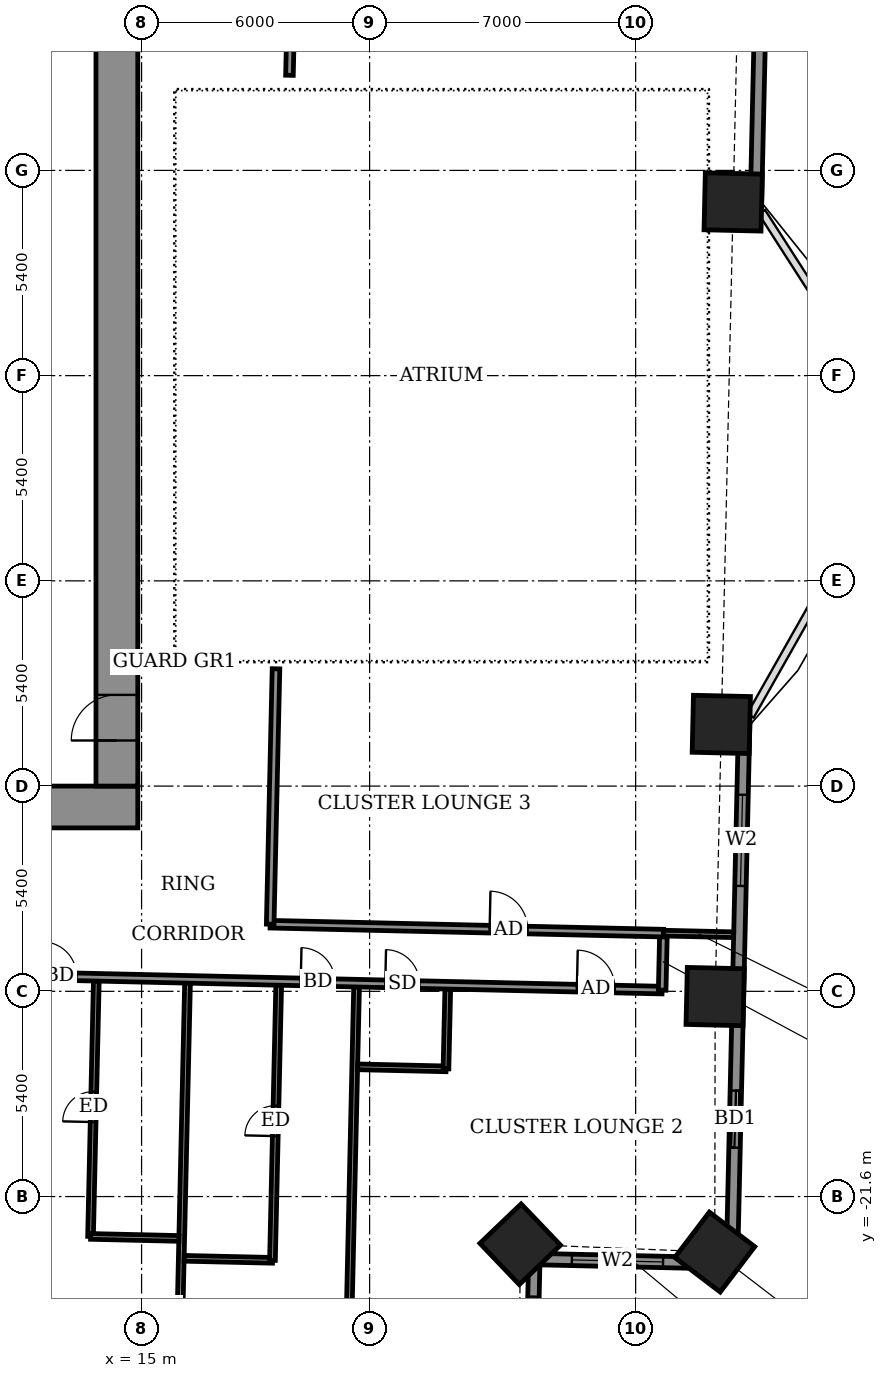
"""IFC4 building model, lengths in metres.
Left out: names, types, materials, properties, quantities, classifications, styles, units other than length and angle.
Written with IfcOpenShell. Run it as: python <this file> out.ifc"""

import sys

from ifc_helpers import new_model, si_unit, direction, frame, frame_2d, origin, origin_2d, place, context, subcontext, project, spatial, rectangle, extrude, element, fill, save


model = new_model("IFC4")
c1 = context("Model", 3, precision=1e-05, world=origin(), true_north=direction((0.0, 1.0)))
c2 = subcontext(c1, "Body", "Model", "MODEL_VIEW")
j1 = project(units=[si_unit("LENGTHUNIT", "METRE"), si_unit("PLANEANGLEUNIT", "RADIAN")], contexts=[c1])
p1 = place(None, origin())
s1 = spatial("IfcSite", under=j1, at=p1, CompositionType="ELEMENT")
p2 = place(p1, origin())
s2 = spatial("IfcBuilding", under=s1, at=p2, CompositionType="ELEMENT")
p3 = place(p2, frame((0.0, 0.0, 56.7)))
s3 = spatial("IfcBuildingStorey", under=s2, at=p3, CompositionType="ELEMENT", Elevation=56.7)
for number, where, z_axis, x_axis in (
    (1, (24.963, -22.855, -0.55), (0.0, 0.0, 1.0), (0.723, 0.691, 0.0)),
    (2, (30.082, -23.061, -0.55), (0.0, 0.0, 1.0), (0.606, 0.796, 0.0)),
    (3, (30.092, -16.338, -0.55), (0.0, 0.0, 1.0), (0.023, 1.0, 0.0)),
    (4, (30.254, -9.177, -0.55), (0.0, 0.0, 1.0), (0.023, 1.0, 0.0)),
    (5, (30.566, 4.57, -0.55), (0.0, 0.0, 1.0), (0.023, 1.0, 0.0)),
):
    element("IfcColumn", number, at=place(p3, frame(where, z_axis=z_axis, x_axis=x_axis)), inside=s3, PredefinedType="COLUMN", context=c2, shape_type="SweptSolid", body=[
        extrude(rectangle(XDim=1.5, YDim=1.5, at=origin_2d()), origin(), (0.0, 0.0, 1.0), 3.6),
    ])
p4 = place(p3, frame((30.533, -23.362, 0.0), z_axis=(0.0, 0.0, 1.0), x_axis=(0.022698800888, 0.999742349027, 0.0)))
e6 = element("IfcWall", 6, at=p4, inside=s3, PredefinedType="SOLIDWALL", context=c2, shape_type="SweptSolid", body=[
    extrude(rectangle(XDim=14.23, YDim=0.3, at=frame_2d((7.115, 0.0))), origin(), (0.0, 0.0, 1.0), 3.05),
])
p5 = place(p4, frame((3.05, 0.0, 0.0)))
e7 = element("IfcOpeningElement", 7, at=p5, cuts=e6, PredefinedType="OPENING", context=c2, shape_type="SweptSolid", body=[
    extrude(rectangle(XDim=1.5, YDim=2.4, at=frame_2d((0.75, 1.2))), frame((0.0, 0.16, 0.0), z_axis=(0.0, -1.0, 0.0), x_axis=(1.0, 0.0, 0.0)), (0.0, 0.0, 1.0), 0.32),
])
p6 = place(p4, frame((9.937, 0.0, 0.9)))
e8 = element("IfcOpeningElement", 8, at=p6, cuts=e6, PredefinedType="OPENING", context=c2, shape_type="SweptSolid", body=[
    extrude(rectangle(XDim=2.4, YDim=1.5, at=frame_2d((1.2, 0.75))), frame((0.0, 0.16, 0.0), z_axis=(0.0, -1.0, 0.0), x_axis=(1.0, 0.0, 0.0)), (0.0, 0.0, 1.0), 0.32),
])
p7 = place(p3, frame((31.165, 4.502, 0.0), z_axis=(0.0, 0.0, 1.0), x_axis=(0.022716307128, 0.999741951401, 0.0)))
e9 = element("IfcWall", 9, at=p7, inside=s3, PredefinedType="SOLIDWALL", context=c2, shape_type="SweptSolid", body=[
    extrude(rectangle(XDim=15.229, YDim=0.3, at=frame_2d((7.615, 0.0))), origin(), (0.0, 0.0, 1.0), 3.05),
])
p8 = place(p7, frame((6.072, 0.0, 0.9)))
e10 = element("IfcOpeningElement", 10, at=p8, cuts=e9, PredefinedType="OPENING", context=c2, shape_type="SweptSolid", body=[
    extrude(rectangle(XDim=0.9, YDim=1.5, at=frame_2d((0.45, 0.75))), frame((0.0, 0.16, 0.0), z_axis=(0.0, -1.0, 0.0), x_axis=(1.0, 0.0, 0.0)), (0.0, 0.0, 1.0), 0.32),
])
p9 = place(p7, frame((11.684, 0.0, 0.0)))
e11 = element("IfcOpeningElement", 11, at=p9, cuts=e9, PredefinedType="OPENING", context=c2, shape_type="SweptSolid", body=[
    extrude(rectangle(XDim=1.5, YDim=2.4, at=frame_2d((0.75, 1.2))), frame((0.0, 0.16, 0.0), z_axis=(0.0, -1.0, 0.0), x_axis=(1.0, 0.0, 0.0)), (0.0, 0.0, 1.0), 0.32),
])
p10 = place(p3, frame((25.216, -28.443, 0.0), z_axis=(0.0, 0.0, 1.0), x_axis=(0.022674484462, 0.999742900827, 0.0)))
e12 = element("IfcWall", 12, at=p10, inside=s3, PredefinedType="SOLIDWALL", context=c2, shape_type="SweptSolid", body=[
    extrude(rectangle(XDim=5.2, YDim=0.3, at=frame_2d((2.6, 0.0))), origin(), (0.0, 0.0, 1.0), 2.55),
])
p11 = place(p10, frame((1.811, 0.0, 0.9)))
e13 = element("IfcOpeningElement", 13, at=p11, cuts=e12, PredefinedType="OPENING", context=c2, shape_type="SweptSolid", body=[
    extrude(rectangle(XDim=2.4, YDim=1.5, at=frame_2d((1.2, 0.75))), frame((0.0, 0.16, 0.0), z_axis=(0.0, -1.0, 0.0), x_axis=(1.0, 0.0, 0.0)), (0.0, 0.0, 1.0), 0.32),
])
p12 = place(p3, frame((25.334, -23.244, 0.0), z_axis=(0.0, 0.0, 1.0), x_axis=(0.999741811307, -0.022722471786, 0.0)))
e14 = element("IfcWall", 14, at=p12, inside=s3, PredefinedType="SOLIDWALL", context=c2, shape_type="SweptSolid", body=[
    extrude(rectangle(XDim=5.2, YDim=0.3, at=frame_2d((2.6, 0.0))), origin(), (0.0, 0.0, 1.0), 2.55),
])
p13 = place(p12, frame((0.988, 0.0, 0.9)))
e15 = element("IfcOpeningElement", 15, at=p13, cuts=e14, PredefinedType="OPENING", context=c2, shape_type="SweptSolid", body=[
    extrude(rectangle(XDim=2.4, YDim=1.5, at=frame_2d((1.2, 0.75))), frame((0.0, 0.16, 0.0), z_axis=(0.0, -1.0, 0.0), x_axis=(1.0, 0.0, 0.0)), (0.0, 0.0, 1.0), 0.32),
])
p14 = place(p3, frame((15.934, -28.082, 0.0), z_axis=(0.0, 0.0, 1.0), x_axis=(0.022719113715, 0.999741887625, 0.0)))
e16 = element("IfcWall", 16, at=p14, inside=s3, PredefinedType="PARTITIONING", context=c2, shape_type="SweptSolid", body=[
    extrude(rectangle(XDim=12.1, YDim=0.15, at=frame_2d((6.05, 0.0))), origin(), (0.0, 0.0, 1.0), 2.55),
])
p15 = place(p3, frame((20.383, -28.183, 0.0), z_axis=(0.0, 0.0, 1.0), x_axis=(0.022637991173, 0.99974372784, 0.0)))
e17 = element("IfcWall", 17, at=p15, inside=s3, PredefinedType="PARTITIONING", context=c2, shape_type="SweptSolid", body=[
    extrude(rectangle(XDim=12.1, YDim=0.15, at=frame_2d((6.05, 0.0))), origin(), (0.0, 0.0, 1.0), 2.55),
])
p16 = place(p3, frame((16.121, -23.225, 0.0), z_axis=(0.0, 0.0, 1.0), x_axis=(0.999740478815, -0.022781023197, 0.0)))
e18 = element("IfcWall", 18, at=p16, inside=s3, PredefinedType="PARTITIONING", context=c2, shape_type="SweptSolid", body=[
    extrude(rectangle(XDim=2.325, YDim=0.15, at=frame_2d((1.163, 0.0))), origin(), (0.0, 0.0, 1.0), 3.05),
])
p17 = place(p3, frame((18.444, -23.278, 0.0), z_axis=(0.0, 0.0, 1.0), x_axis=(0.022627186748, 0.999743972435, 0.0)))
e19 = element("IfcWall", 19, at=p17, inside=s3, PredefinedType="PARTITIONING", context=c2, shape_type="SweptSolid", body=[
    extrude(rectangle(XDim=7.24, YDim=0.15, at=frame_2d((3.62, 0.0))), origin(), (0.0, 0.0, 1.0), 3.05),
])
p18 = place(p17, frame((3.27, 0.0, 0.0)))
e20 = element("IfcOpeningElement", 20, at=p18, cuts=e19, PredefinedType="OPENING", context=c2, shape_type="SweptSolid", body=[
    extrude(rectangle(XDim=0.8, YDim=2.1, at=frame_2d((0.4, 1.05))), frame((0.0, 0.085, 0.0), z_axis=(0.0, -1.0, 0.0), x_axis=(1.0, 0.0, 0.0)), (0.0, 0.0, 1.0), 0.17),
])
p19 = place(p3, frame((13.657, -22.649, 0.0), z_axis=(0.0, 0.0, 1.0), x_axis=(0.022634748998, 0.99974380125, 0.0)))
e21 = element("IfcWall", 21, at=p19, inside=s3, PredefinedType="PARTITIONING", context=c2, shape_type="SweptSolid", body=[
    extrude(rectangle(XDim=6.72, YDim=0.15, at=frame_2d((3.36, 0.0))), origin(), (0.0, 0.0, 1.0), 3.05),
])
p20 = place(p19, frame((3.01, 0.0, 0.0)))
e22 = element("IfcOpeningElement", 22, at=p20, cuts=e21, PredefinedType="OPENING", context=c2, shape_type="SweptSolid", body=[
    extrude(rectangle(XDim=0.8, YDim=2.1, at=frame_2d((0.4, 1.05))), frame((0.0, 0.085, 0.0), z_axis=(0.0, -1.0, 0.0), x_axis=(1.0, 0.0, 0.0)), (0.0, 0.0, 1.0), 0.17),
])
for number, where, z_axis, x_axis in (
    (23, (13.659, -22.649, 0.0), (0.0, 0.0, 1.0), (1.0, -0.023, 0.0)),
    (24, (20.687, -18.187, 0.0), (0.0, 0.0, 1.0), (1.0, -0.023, 0.0)),
):
    element("IfcWall", number, at=place(p3, frame(where, z_axis=z_axis, x_axis=x_axis)), inside=s3, PredefinedType="PARTITIONING", context=c2, shape_type="SweptSolid", body=[
        extrude(rectangle(XDim=2.324, YDim=0.15, at=frame_2d((1.162, 0.0))), origin(), (0.0, 0.0, 1.0), 3.05),
    ])
p21 = place(p3, frame((23.009, -18.24, 0.0), z_axis=(0.0, 0.0, 1.0), x_axis=(0.022792727877, 0.999740212033, 0.0)))
e25 = element("IfcWall", 25, at=p21, inside=s3, PredefinedType="PARTITIONING", context=c2, shape_type="SweptSolid", body=[
    extrude(rectangle(XDim=2.099, YDim=0.15, at=frame_2d((1.05, 0.0))), origin(), (0.0, 0.0, 1.0), 3.05),
])
p22 = place(p3, frame((-26.126, -14.924, 0.0), z_axis=(0.0, 0.0, 1.0), x_axis=(0.999742687583, -0.0226838847, 0.0)))
e26 = element("IfcWall", 26, at=p22, inside=s3, PredefinedType="PARTITIONING", context=c2, shape_type="SweptSolid", body=[
    extrude(rectangle(XDim=54.836, YDim=0.2, at=frame_2d((27.418, 0.0))), origin(), (0.0, 0.0, 1.0), 3.05),
])
p23 = place(p22, frame((0.775, 0.0, 0.0)))
e27 = element("IfcOpeningElement", 27, at=p23, cuts=e26, PredefinedType="OPENING", context=c2, shape_type="SweptSolid", body=[
    extrude(rectangle(XDim=1.0, YDim=2.1, at=frame_2d((0.5, 1.05))), frame((0.0, 0.11, 0.0), z_axis=(0.0, -1.0, 0.0), x_axis=(1.0, 0.0, 0.0)), (0.0, 0.0, 1.0), 0.22),
])
p24 = place(p22, frame((5.45, 0.0, 0.0)))
e28 = element("IfcOpeningElement", 28, at=p24, cuts=e26, PredefinedType="OPENING", context=c2, shape_type="SweptSolid", body=[
    extrude(rectangle(XDim=0.9, YDim=2.1, at=frame_2d((0.45, 1.05))), frame((0.0, 0.11, 0.0), z_axis=(0.0, -1.0, 0.0), x_axis=(1.0, 0.0, 0.0)), (0.0, 0.0, 1.0), 0.22),
])
p25 = place(p22, frame((10.0, 0.0, 0.0)))
e29 = element("IfcOpeningElement", 29, at=p25, cuts=e26, PredefinedType="OPENING", context=c2, shape_type="SweptSolid", body=[
    extrude(rectangle(XDim=0.9, YDim=2.1, at=frame_2d((0.45, 1.05))), frame((0.0, 0.11, 0.0), z_axis=(0.0, -1.0, 0.0), x_axis=(1.0, 0.0, 0.0)), (0.0, 0.0, 1.0), 0.22),
])
p26 = place(p22, frame((11.975, 0.0, 0.0)))
e30 = element("IfcOpeningElement", 30, at=p26, cuts=e26, PredefinedType="OPENING", context=c2, shape_type="SweptSolid", body=[
    extrude(rectangle(XDim=0.9, YDim=2.1, at=frame_2d((0.45, 1.05))), frame((0.0, 0.11, 0.0), z_axis=(0.0, -1.0, 0.0), x_axis=(1.0, 0.0, 0.0)), (0.0, 0.0, 1.0), 0.22),
])
p27 = place(p22, frame((18.85, 0.0, 0.0)))
e31 = element("IfcOpeningElement", 31, at=p27, cuts=e26, PredefinedType="OPENING", context=c2, shape_type="SweptSolid", body=[
    extrude(rectangle(XDim=0.9, YDim=2.1, at=frame_2d((0.45, 1.05))), frame((0.0, 0.11, 0.0), z_axis=(0.0, -1.0, 0.0), x_axis=(1.0, 0.0, 0.0)), (0.0, 0.0, 1.0), 0.22),
])
p28 = place(p22, frame((20.9, 0.0, 0.0)))
e32 = element("IfcOpeningElement", 32, at=p28, cuts=e26, PredefinedType="OPENING", context=c2, shape_type="SweptSolid", body=[
    extrude(rectangle(XDim=0.9, YDim=2.1, at=frame_2d((0.45, 1.05))), frame((0.0, 0.11, 0.0), z_axis=(0.0, -1.0, 0.0), x_axis=(1.0, 0.0, 0.0)), (0.0, 0.0, 1.0), 0.22),
])
p29 = place(p22, frame((27.725, 0.0, 0.0)))
e33 = element("IfcOpeningElement", 33, at=p29, cuts=e26, PredefinedType="OPENING", context=c2, shape_type="SweptSolid", body=[
    extrude(rectangle(XDim=0.9, YDim=2.1, at=frame_2d((0.45, 1.05))), frame((0.0, 0.11, 0.0), z_axis=(0.0, -1.0, 0.0), x_axis=(1.0, 0.0, 0.0)), (0.0, 0.0, 1.0), 0.22),
])
p30 = place(p22, frame((29.7, 0.0, 0.0)))
e34 = element("IfcOpeningElement", 34, at=p30, cuts=e26, PredefinedType="OPENING", context=c2, shape_type="SweptSolid", body=[
    extrude(rectangle(XDim=0.9, YDim=2.1, at=frame_2d((0.45, 1.05))), frame((0.0, 0.11, 0.0), z_axis=(0.0, -1.0, 0.0), x_axis=(1.0, 0.0, 0.0)), (0.0, 0.0, 1.0), 0.22),
])
p31 = place(p22, frame((36.5, 0.0, 0.0)))
e35 = element("IfcOpeningElement", 35, at=p31, cuts=e26, PredefinedType="OPENING", context=c2, shape_type="SweptSolid", body=[
    extrude(rectangle(XDim=0.9, YDim=2.1, at=frame_2d((0.45, 1.05))), frame((0.0, 0.11, 0.0), z_axis=(0.0, -1.0, 0.0), x_axis=(1.0, 0.0, 0.0)), (0.0, 0.0, 1.0), 0.22),
])
p32 = place(p22, frame((38.525, 0.0, 0.0)))
e36 = element("IfcOpeningElement", 36, at=p32, cuts=e26, PredefinedType="OPENING", context=c2, shape_type="SweptSolid", body=[
    extrude(rectangle(XDim=0.9, YDim=2.1, at=frame_2d((0.45, 1.05))), frame((0.0, 0.11, 0.0), z_axis=(0.0, -1.0, 0.0), x_axis=(1.0, 0.0, 0.0)), (0.0, 0.0, 1.0), 0.22),
])
p33 = place(p22, frame((45.325, 0.0, 0.0)))
e37 = element("IfcOpeningElement", 37, at=p33, cuts=e26, PredefinedType="OPENING", context=c2, shape_type="SweptSolid", body=[
    extrude(rectangle(XDim=0.9, YDim=2.1, at=frame_2d((0.45, 1.05))), frame((0.0, 0.11, 0.0), z_axis=(0.0, -1.0, 0.0), x_axis=(1.0, 0.0, 0.0)), (0.0, 0.0, 1.0), 0.22),
])
p34 = place(p22, frame((52.593, 0.0, 0.0)))
e38 = element("IfcOpeningElement", 38, at=p34, cuts=e26, PredefinedType="OPENING", context=c2, shape_type="SweptSolid", body=[
    extrude(rectangle(XDim=1.0, YDim=2.1, at=frame_2d((0.5, 1.05))), frame((0.0, 0.11, 0.0), z_axis=(0.0, -1.0, 0.0), x_axis=(1.0, 0.0, 0.0)), (0.0, 0.0, 1.0), 0.22),
])
p35 = place(p22, frame((47.55, 0.0, 0.0)))
e39 = element("IfcOpeningElement", 39, at=p35, cuts=e26, PredefinedType="OPENING", context=c2, shape_type="SweptSolid", body=[
    extrude(rectangle(XDim=0.9, YDim=2.1, at=frame_2d((0.45, 1.05))), frame((0.0, 0.11, 0.0), z_axis=(0.0, -1.0, 0.0), x_axis=(1.0, 0.0, 0.0)), (0.0, 0.0, 1.0), 0.22),
])
p36 = place(p3, frame((28.698, -16.169, 0.0), z_axis=(0.0, 0.0, 1.0), x_axis=(0.022617910375, 0.999744182344, 0.0)))
e40 = element("IfcWall", 40, at=p36, inside=s3, PredefinedType="PARTITIONING", context=c2, shape_type="SweptSolid", body=[
    extrude(rectangle(XDim=1.5, YDim=0.2, at=frame_2d((0.75, 0.0))), origin(), (0.0, 0.0, 1.0), 3.05),
])
p37 = place(p3, frame((18.382, -14.434, 0.0), z_axis=(0.0, 0.0, 1.0), x_axis=(0.999742529177, -0.022690865001, 0.0)))
e41 = element("IfcWall", 41, at=p37, inside=s3, PredefinedType="PARTITIONING", context=c2, shape_type="SweptSolid", body=[
    extrude(rectangle(XDim=10.351, YDim=0.2, at=frame_2d((5.175, 0.0))), origin(), (0.0, 0.0, 1.0), 3.05),
])
p38 = place(p37, frame((5.777, 0.0, 0.0)))
e42 = element("IfcOpeningElement", 42, at=p38, cuts=e41, PredefinedType="OPENING", context=c2, shape_type="SweptSolid", body=[
    extrude(rectangle(XDim=1.0, YDim=2.1, at=frame_2d((0.5, 1.05))), frame((0.0, 0.11, 0.0), z_axis=(0.0, -1.0, 0.0), x_axis=(1.0, 0.0, 0.0)), (0.0, 0.0, 1.0), 0.22),
])
p39 = place(p3, frame((18.384, -14.434, 0.0), z_axis=(0.0, 0.0, 1.0), x_axis=(0.022773383809, 0.999740652864, 0.0)))
e43 = element("IfcWall", 43, at=p39, inside=s3, PredefinedType="PARTITIONING", context=c2, shape_type="SweptSolid", body=[
    extrude(rectangle(XDim=6.722, YDim=0.2, at=frame_2d((3.361, 0.0))), origin(), (0.0, 0.0, 1.0), 3.05),
])
p40 = place(p3, frame((28.73, -14.669, 0.0), z_axis=(0.0, 0.0, 1.0), x_axis=(0.999742244252, -0.022703415106, 0.0)))
e44 = element("IfcWall", 44, at=p40, inside=s3, PredefinedType="PARTITIONING", context=c2, shape_type="SweptSolid", body=[
    extrude(rectangle(XDim=1.85, YDim=0.15, at=frame_2d((0.925, 0.0))), origin(), (0.0, 0.0, 1.0), 2.55),
])
p41 = place(p3, frame((18.891, 7.903, 0.0), z_axis=(0.0, 0.0, 1.0), x_axis=(0.022807092041, 0.999739884446, 0.0)))
e45 = element("IfcWall", 45, at=p41, inside=s3, PredefinedType="PARTITIONING", context=c2, shape_type="SweptSolid", body=[
    extrude(rectangle(XDim=4.207, YDim=0.2, at=frame_2d((2.104, 0.0))), origin(), (0.0, 0.0, 1.0), 3.05),
])
p42 = place(p3, frame((-14.9, -11.35, 0.0), z_axis=(0.0, 0.0, 1.0), x_axis=(1.0, 0.0, 0.0)))
e46 = element("IfcWall", 46, at=p42, inside=s3, PredefinedType="SHEAR", context=c2, shape_type="SweptSolid", body=[
    extrude(rectangle(XDim=29.8, YDim=1.1, at=frame_2d((14.9, 0.0))), origin(), (0.0, 0.0, 1.0), 3.6),
])
p43 = place(p3, frame((14.35, -10.8, 0.0), z_axis=(0.0, 0.0, 1.0), x_axis=(0.0, 1.0, 0.0)))
e47 = element("IfcWall", 47, at=p43, inside=s3, PredefinedType="SHEAR", context=c2, shape_type="SweptSolid", body=[
    extrude(rectangle(XDim=21.6, YDim=1.1, at=frame_2d((10.8, 0.0))), origin(), (0.0, 0.0, 1.0), 3.6),
])
p44 = place(p43, frame((1.2, 0.0, 0.0)))
e48 = element("IfcOpeningElement", 48, at=p44, cuts=e47, PredefinedType="OPENING", context=c2, shape_type="SweptSolid", body=[
    extrude(rectangle(XDim=1.2, YDim=2.1, at=frame_2d((0.6, 1.05))), frame((0.0, 0.56, 0.0), z_axis=(0.0, -1.0, 0.0), x_axis=(1.0, 0.0, 0.0)), (0.0, 0.0, 1.0), 1.12),
])
p45 = place(p5, origin())
e49 = element("IfcDoor", 49, at=p45, inside=s3, OperationType="SLIDING_TO_LEFT", PredefinedType="DOOR", context=c2, shape_type="SweptSolid", body=[
    extrude(rectangle(XDim=1.5, YDim=2.4, at=frame_2d((0.75, 1.2))), frame((0.0, 0.025, 0.0), z_axis=(0.0, -1.0, 0.0), x_axis=(1.0, 0.0, 0.0)), (0.0, 0.0, 1.0), 0.05),
])
fill(e7, e49)
p46 = place(p6, origin())
e50 = element("IfcWindow", 50, at=p46, inside=s3, PartitioningType="DOUBLE_PANEL_VERTICAL", PredefinedType="WINDOW", context=c2, shape_type="SweptSolid", body=[
    extrude(rectangle(XDim=2.4, YDim=1.5, at=frame_2d((1.2, 0.75))), frame((0.0, 0.03, 0.0), z_axis=(0.0, -1.0, 0.0), x_axis=(1.0, 0.0, 0.0)), (0.0, 0.0, 1.0), 0.06),
])
fill(e8, e50)
p47 = place(p11, origin())
e51 = element("IfcWindow", 51, at=p47, inside=s3, PartitioningType="DOUBLE_PANEL_VERTICAL", PredefinedType="WINDOW", context=c2, shape_type="SweptSolid", body=[
    extrude(rectangle(XDim=2.4, YDim=1.5, at=frame_2d((1.2, 0.75))), frame((0.0, 0.03, 0.0), z_axis=(0.0, -1.0, 0.0), x_axis=(1.0, 0.0, 0.0)), (0.0, 0.0, 1.0), 0.06),
])
fill(e13, e51)
p48 = place(p13, origin())
e52 = element("IfcWindow", 52, at=p48, inside=s3, PartitioningType="DOUBLE_PANEL_VERTICAL", PredefinedType="WINDOW", context=c2, shape_type="SweptSolid", body=[
    extrude(rectangle(XDim=2.4, YDim=1.5, at=frame_2d((1.2, 0.75))), frame((0.0, 0.03, 0.0), z_axis=(0.0, -1.0, 0.0), x_axis=(1.0, 0.0, 0.0)), (0.0, 0.0, 1.0), 0.06),
])
fill(e15, e52)
p49 = place(p32, origin())
e53 = element("IfcDoor", 53, at=p49, inside=s3, OperationType="SINGLE_SWING_RIGHT", PredefinedType="DOOR", context=c2, shape_type="SweptSolid", body=[
    extrude(rectangle(XDim=0.9, YDim=2.1, at=frame_2d((0.45, 1.05))), frame((0.0, 0.025, 0.0), z_axis=(0.0, -1.0, 0.0), x_axis=(1.0, 0.0, 0.0)), (0.0, 0.0, 1.0), 0.05),
])
fill(e36, e53)
p50 = place(p20, origin())
e54 = element("IfcDoor", 54, at=p50, inside=s3, OperationType="SINGLE_SWING_RIGHT", PredefinedType="DOOR", context=c2, shape_type="SweptSolid", body=[
    extrude(rectangle(XDim=0.8, YDim=2.1, at=frame_2d((0.4, 1.05))), frame((0.0, 0.025, 0.0), z_axis=(0.0, -1.0, 0.0), x_axis=(1.0, 0.0, 0.0)), (0.0, 0.0, 1.0), 0.05),
])
fill(e22, e54)
p51 = place(p33, origin())
e55 = element("IfcDoor", 55, at=p51, inside=s3, OperationType="SINGLE_SWING_LEFT", PredefinedType="DOOR", context=c2, shape_type="SweptSolid", body=[
    extrude(rectangle(XDim=0.9, YDim=2.1, at=frame_2d((0.45, 1.05))), frame((0.0, 0.025, 0.0), z_axis=(0.0, -1.0, 0.0), x_axis=(1.0, 0.0, 0.0)), (0.0, 0.0, 1.0), 0.05),
])
fill(e37, e55)
p52 = place(p18, origin())
e56 = element("IfcDoor", 56, at=p52, inside=s3, OperationType="SINGLE_SWING_LEFT", PredefinedType="DOOR", context=c2, shape_type="SweptSolid", body=[
    extrude(rectangle(XDim=0.8, YDim=2.1, at=frame_2d((0.4, 1.05))), frame((0.0, 0.025, 0.0), z_axis=(0.0, -1.0, 0.0), x_axis=(1.0, 0.0, 0.0)), (0.0, 0.0, 1.0), 0.05),
])
fill(e20, e56)
p53 = place(p34, origin())
e57 = element("IfcDoor", 57, at=p53, inside=s3, OperationType="SINGLE_SWING_RIGHT", PredefinedType="DOOR", context=c2, shape_type="SweptSolid", body=[
    extrude(rectangle(XDim=1.0, YDim=2.1, at=frame_2d((0.5, 1.05))), frame((0.0, 0.025, 0.0), z_axis=(0.0, -1.0, 0.0), x_axis=(1.0, 0.0, 0.0)), (0.0, 0.0, 1.0), 0.05),
])
fill(e38, e57)
p54 = place(p35, origin())
e58 = element("IfcDoor", 58, at=p54, inside=s3, OperationType="SINGLE_SWING_RIGHT", PredefinedType="DOOR", context=c2, shape_type="SweptSolid", body=[
    extrude(rectangle(XDim=0.9, YDim=2.1, at=frame_2d((0.45, 1.05))), frame((0.0, 0.025, 0.0), z_axis=(0.0, -1.0, 0.0), x_axis=(1.0, 0.0, 0.0)), (0.0, 0.0, 1.0), 0.05),
])
fill(e39, e58)
p55 = place(p38, origin())
e59 = element("IfcDoor", 59, at=p55, inside=s3, OperationType="SINGLE_SWING_LEFT", PredefinedType="DOOR", context=c2, shape_type="SweptSolid", body=[
    extrude(rectangle(XDim=1.0, YDim=2.1, at=frame_2d((0.5, 1.05))), frame((0.0, 0.025, 0.0), z_axis=(0.0, -1.0, 0.0), x_axis=(1.0, 0.0, 0.0)), (0.0, 0.0, 1.0), 0.05),
])
fill(e42, e59)
p56 = place(p44, origin())
e60 = element("IfcDoor", 60, at=p56, inside=s3, OperationType="DOUBLE_DOOR_SINGLE_SWING", PredefinedType="DOOR", context=c2, shape_type="SweptSolid", body=[
    extrude(rectangle(XDim=1.2, YDim=2.1, at=frame_2d((0.6, 1.05))), frame((0.0, 0.025, 0.0), z_axis=(0.0, -1.0, 0.0), x_axis=(1.0, 0.0, 0.0)), (0.0, 0.0, 1.0), 0.05),
])
fill(e48, e60)
save(model, sys.argv[1])
